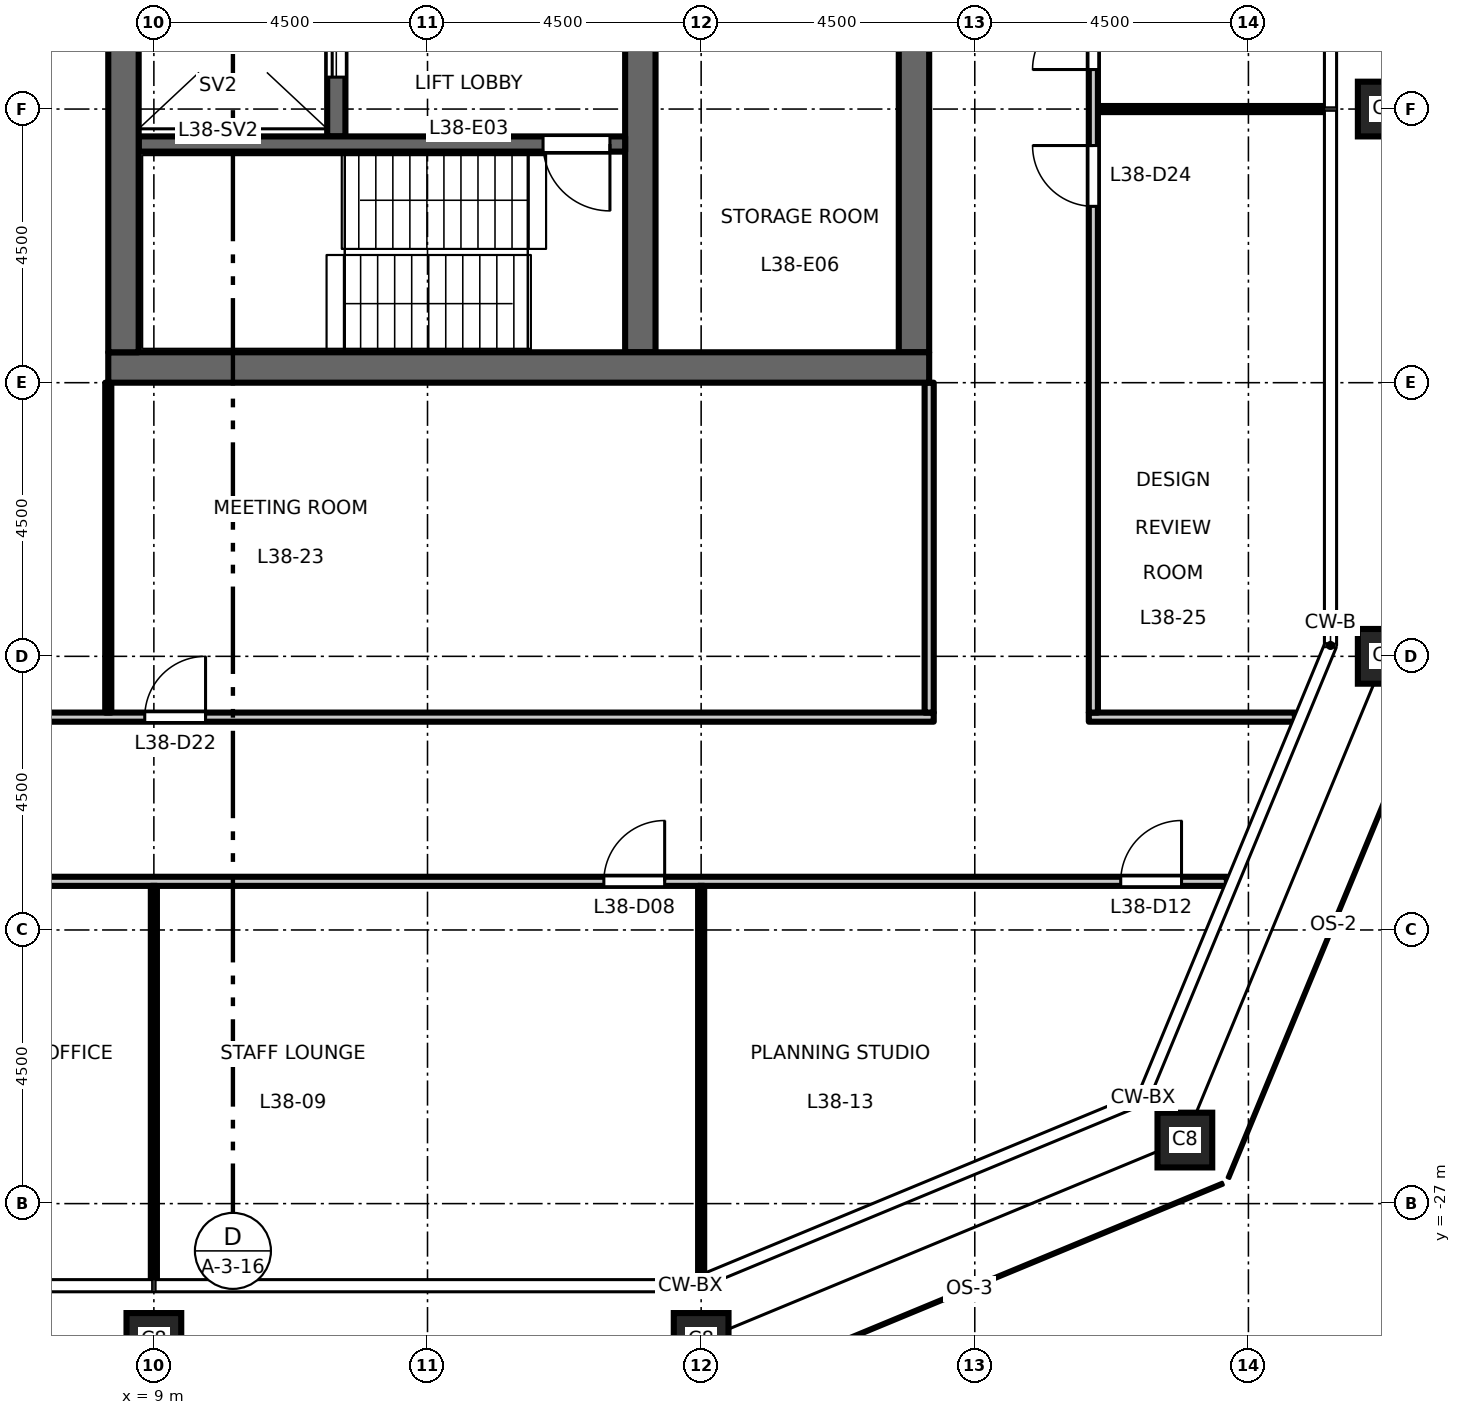
"""IFC4 building model, lengths in metres.
Left out: names, types, materials, properties, quantities, classifications, styles, units other than length and angle.
Written with IfcOpenShell. Run it as: python <this file> out.ifc"""

import sys

from ifc_helpers import new_model, si_unit, direction, frame, frame_2d, origin, origin_2d, place, context, subcontext, project, spatial, rectangle, hollow_rectangle, extrude, element, fill, save


model = new_model("IFC4")
c1 = context("Model", 3, precision=1e-05, world=origin(), true_north=direction((0.0, 1.0)))
c2 = subcontext(c1, "Body", "Model", "MODEL_VIEW")
j1 = project(units=[si_unit("LENGTHUNIT", "METRE"), si_unit("PLANEANGLEUNIT", "RADIAN")], contexts=[c1])
p1 = place(None, origin())
s1 = spatial("IfcSite", under=j1, at=p1, CompositionType="ELEMENT")
p2 = place(p1, origin())
s2 = spatial("IfcBuilding", under=s1, at=p2, CompositionType="ELEMENT")
p3 = place(p2, frame((0.0, 0.0, 176.7)))
s3 = spatial("IfcBuildingStorey", under=s2, at=p3, CompositionType="ELEMENT", Elevation=176.7)
for number, where, z_axis, x_axis in (
    (1, (9.0, -29.25, 0.0), (0.0, 0.0, 1.0), (1.0, 0.0, 0.0)),
    (2, (18.0, -29.25, 0.0), (0.0, 0.0, 1.0), (1.0, 0.0, 0.0)),
    (3, (25.955, -25.955, 0.0), (0.0, 0.0, 1.0), (1.0, 0.0, 0.0)),
    (4, (29.25, -18.0, 0.0), (0.0, 0.0, 1.0), (1.0, 0.0, 0.0)),
    (5, (29.25, -9.0, 0.0), (0.0, 0.0, 1.0), (1.0, 0.0, 0.0)),
):
    element("IfcColumn", number, at=place(p3, frame(where, z_axis=z_axis, x_axis=x_axis)), inside=s3, PredefinedType="COLUMN", context=c2, shape_type="SweptSolid", body=[
        extrude(hollow_rectangle(XDim=0.9, YDim=0.9, WallThickness=0.05, at=origin_2d()), origin(), (0.0, 0.0, 1.0), 4.5),
    ])
p4 = place(p3, frame((12.0, -9.45, 0.0), z_axis=(0.0, 0.0, 1.0), x_axis=(0.0, 1.0, 0.0)))
e6 = element("IfcWall", 6, at=p4, inside=s3, PredefinedType="SHEAR", context=c2, shape_type="SweptSolid", body=[
    extrude(rectangle(XDim=18.9, YDim=0.3, at=frame_2d((9.45, 0.0))), origin(), (0.0, 0.0, 1.0), 4.3),
])
p5 = place(p4, frame((3.625, 0.0, 0.0)))
e7 = element("IfcOpeningElement", 7, at=p5, cuts=e6, PredefinedType="OPENING", context=c2, shape_type="SweptSolid", body=[
    extrude(rectangle(XDim=1.1, YDim=2.1, at=frame_2d((0.55, 1.05))), frame((0.0, 0.16, 0.0), z_axis=(0.0, -1.0, 0.0), x_axis=(1.0, 0.0, 0.0)), (0.0, 0.0, 1.0), 0.32),
])
p6 = place(p4, frame((6.775, 0.0, 0.0)))
e8 = element("IfcOpeningElement", 8, at=p6, cuts=e6, PredefinedType="OPENING", context=c2, shape_type="SweptSolid", body=[
    extrude(rectangle(XDim=1.1, YDim=2.1, at=frame_2d((0.55, 1.05))), frame((0.0, 0.16, 0.0), z_axis=(0.0, -1.0, 0.0), x_axis=(1.0, 0.0, 0.0)), (0.0, 0.0, 1.0), 0.32),
])
p7 = place(p4, frame((9.925, 0.0, 0.0)))
e9 = element("IfcOpeningElement", 9, at=p7, cuts=e6, PredefinedType="OPENING", context=c2, shape_type="SweptSolid", body=[
    extrude(rectangle(XDim=1.1, YDim=2.1, at=frame_2d((0.55, 1.05))), frame((0.0, 0.16, 0.0), z_axis=(0.0, -1.0, 0.0), x_axis=(1.0, 0.0, 0.0)), (0.0, 0.0, 1.0), 0.32),
])
p8 = place(p4, frame((13.075, 0.0, 0.0)))
e10 = element("IfcOpeningElement", 10, at=p8, cuts=e6, PredefinedType="OPENING", context=c2, shape_type="SweptSolid", body=[
    extrude(rectangle(XDim=1.1, YDim=2.1, at=frame_2d((0.55, 1.05))), frame((0.0, 0.16, 0.0), z_axis=(0.0, -1.0, 0.0), x_axis=(1.0, 0.0, 0.0)), (0.0, 0.0, 1.0), 0.32),
])
p9 = place(p4, frame((16.725, 0.0, 0.0)))
e11 = element("IfcOpeningElement", 11, at=p9, cuts=e6, PredefinedType="OPENING", context=c2, shape_type="SweptSolid", body=[
    extrude(rectangle(XDim=1.2, YDim=2.1, at=frame_2d((0.6, 1.05))), frame((0.0, 0.16, 0.0), z_axis=(0.0, -1.0, 0.0), x_axis=(1.0, 0.0, 0.0)), (0.0, 0.0, 1.0), 0.32),
])
p10 = place(p4, frame((0.975, 0.0, 0.0)))
e12 = element("IfcOpeningElement", 12, at=p10, cuts=e6, PredefinedType="OPENING", context=c2, shape_type="SweptSolid", body=[
    extrude(rectangle(XDim=1.2, YDim=2.1, at=frame_2d((0.6, 1.05))), frame((0.0, 0.16, 0.0), z_axis=(0.0, -1.0, 0.0), x_axis=(1.0, 0.0, 0.0)), (0.0, 0.0, 1.0), 0.32),
])
p11 = place(p3, frame((21.5, -13.0, 0.0), z_axis=(0.0, 0.0, 1.0), x_axis=(0.0, 1.0, 0.0)))
e13 = element("IfcWall", 13, at=p11, inside=s3, PredefinedType="SHEAR", context=c2, shape_type="SweptSolid", body=[
    extrude(rectangle(XDim=26.0, YDim=0.5, at=frame_2d((13.0, 0.0))), origin(), (0.0, 0.0, 1.0), 4.3),
])
p12 = place(p11, frame((16.825, 0.0, 0.0)))
e14 = element("IfcOpeningElement", 14, at=p12, cuts=e13, PredefinedType="OPENING", context=c2, shape_type="SweptSolid", body=[
    extrude(rectangle(XDim=1.8, YDim=2.1, at=frame_2d((0.9, 1.05))), frame((0.0, 0.26, 0.0), z_axis=(0.0, -1.0, 0.0), x_axis=(1.0, 0.0, 0.0)), (0.0, 0.0, 1.0), 0.52),
])
p13 = place(p11, frame((7.375, 0.0, 0.0)))
e15 = element("IfcOpeningElement", 15, at=p13, cuts=e13, PredefinedType="OPENING", context=c2, shape_type="SweptSolid", body=[
    extrude(rectangle(XDim=1.8, YDim=2.1, at=frame_2d((0.9, 1.05))), frame((0.0, 0.26, 0.0), z_axis=(0.0, -1.0, 0.0), x_axis=(1.0, 0.0, 0.0)), (0.0, 0.0, 1.0), 0.52),
])
p14 = place(p3, frame((17.0, -13.0, 0.0), z_axis=(0.0, 0.0, 1.0), x_axis=(0.0, 1.0, 0.0)))
e16 = element("IfcWall", 16, at=p14, inside=s3, PredefinedType="SHEAR", context=c2, shape_type="SweptSolid", body=[
    extrude(rectangle(XDim=6.575, YDim=0.5, at=frame_2d((3.288, 0.0))), origin(), (0.0, 0.0, 1.0), 4.3),
])
p15 = place(p3, frame((8.75, -9.575, 0.0), z_axis=(0.0, 0.0, 1.0), x_axis=(1.0, 0.0, 0.0)))
e17 = element("IfcWall", 17, at=p15, inside=s3, PredefinedType="SHEAR", context=c2, shape_type="SweptSolid", body=[
    extrude(rectangle(XDim=8.0, YDim=0.25, at=frame_2d((4.0, 0.0))), origin(), (0.0, 0.0, 1.0), 4.3),
])
p16 = place(p15, frame((6.65, 0.0, 0.0)))
e18 = element("IfcOpeningElement", 18, at=p16, cuts=e17, PredefinedType="OPENING", context=c2, shape_type="SweptSolid", body=[
    extrude(rectangle(XDim=1.1, YDim=2.1, at=frame_2d((0.55, 1.05))), frame((0.0, 0.135, 0.0), z_axis=(0.0, -1.0, 0.0), x_axis=(1.0, 0.0, 0.0)), (0.0, 0.0, 1.0), 0.27),
])
p17 = place(p3, frame((8.25, -13.25, 0.0), z_axis=(0.0, 0.0, 1.0), x_axis=(1.0, 0.0, 0.0)))
e19 = element("IfcWall", 19, at=p17, inside=s3, PredefinedType="SHEAR", context=c2, shape_type="SweptSolid", body=[
    extrude(rectangle(XDim=13.5, YDim=0.5, at=frame_2d((6.75, 0.0))), origin(), (0.0, 0.0, 1.0), 4.3),
])
p18 = place(p3, frame((8.5, -13.0, 0.0), z_axis=(0.0, 0.0, 1.0), x_axis=(0.0, 1.0, 0.0)))
e20 = element("IfcWall", 20, at=p18, inside=s3, PredefinedType="SHEAR", context=c2, shape_type="SweptSolid", body=[
    extrude(rectangle(XDim=26.0, YDim=0.5, at=frame_2d((13.0, 0.0))), origin(), (0.0, 0.0, 1.0), 4.3),
])
p19 = place(p3, frame((-26.646, -21.7, 0.0), z_axis=(0.0, 0.0, 1.0), x_axis=(1.0, 0.0, 0.0)))
e21 = element("IfcWall", 21, at=p19, inside=s3, PredefinedType="PARTITIONING", context=c2, shape_type="SweptSolid", body=[
    extrude(rectangle(XDim=53.292, YDim=0.15, at=frame_2d((26.646, 0.0))), origin(), (0.0, 0.0, 1.0), 4.3),
])
p20 = place(p19, frame((9.296, 0.0, 0.0)))
e22 = element("IfcOpeningElement", 22, at=p20, cuts=e21, PredefinedType="OPENING", context=c2, shape_type="SweptSolid", body=[
    extrude(rectangle(XDim=1.0, YDim=2.1, at=frame_2d((0.5, 1.05))), frame((0.0, 0.085, 0.0), z_axis=(0.0, -1.0, 0.0), x_axis=(1.0, 0.0, 0.0)), (0.0, 0.0, 1.0), 0.17),
])
p21 = place(p19, frame((25.046, 0.0, 0.0)))
e23 = element("IfcOpeningElement", 23, at=p21, cuts=e21, PredefinedType="OPENING", context=c2, shape_type="SweptSolid", body=[
    extrude(rectangle(XDim=1.0, YDim=2.1, at=frame_2d((0.5, 1.05))), frame((0.0, 0.085, 0.0), z_axis=(0.0, -1.0, 0.0), x_axis=(1.0, 0.0, 0.0)), (0.0, 0.0, 1.0), 0.17),
])
p22 = place(p19, frame((27.296, 0.0, 0.0)))
e24 = element("IfcOpeningElement", 24, at=p22, cuts=e21, PredefinedType="OPENING", context=c2, shape_type="SweptSolid", body=[
    extrude(rectangle(XDim=1.0, YDim=2.1, at=frame_2d((0.5, 1.05))), frame((0.0, 0.085, 0.0), z_axis=(0.0, -1.0, 0.0), x_axis=(1.0, 0.0, 0.0)), (0.0, 0.0, 1.0), 0.17),
])
p23 = place(p19, frame((43.046, 0.0, 0.0)))
e25 = element("IfcOpeningElement", 25, at=p23, cuts=e21, PredefinedType="OPENING", context=c2, shape_type="SweptSolid", body=[
    extrude(rectangle(XDim=1.0, YDim=2.1, at=frame_2d((0.5, 1.05))), frame((0.0, 0.085, 0.0), z_axis=(0.0, -1.0, 0.0), x_axis=(1.0, 0.0, 0.0)), (0.0, 0.0, 1.0), 0.17),
])
p24 = place(p19, frame((0.65, 0.0, 0.0)))
e26 = element("IfcOpeningElement", 26, at=p24, cuts=e21, PredefinedType="OPENING", context=c2, shape_type="SweptSolid", body=[
    extrude(rectangle(XDim=1.0, YDim=2.1, at=frame_2d((0.5, 1.05))), frame((0.0, 0.085, 0.0), z_axis=(0.0, -1.0, 0.0), x_axis=(1.0, 0.0, 0.0)), (0.0, 0.0, 1.0), 0.17),
])
p25 = place(p19, frame((51.546, 0.0, 0.0)))
e27 = element("IfcOpeningElement", 27, at=p25, cuts=e21, PredefinedType="OPENING", context=c2, shape_type="SweptSolid", body=[
    extrude(rectangle(XDim=1.0, YDim=2.1, at=frame_2d((0.5, 1.05))), frame((0.0, 0.085, 0.0), z_axis=(0.0, -1.0, 0.0), x_axis=(1.0, 0.0, 0.0)), (0.0, 0.0, 1.0), 0.17),
])
p26 = place(p3, frame((-21.825, -19.0, 0.0), z_axis=(0.0, 0.0, 1.0), x_axis=(1.0, 0.0, 0.0)))
e28 = element("IfcWall", 28, at=p26, inside=s3, PredefinedType="PARTITIONING", context=c2, shape_type="SweptSolid", body=[
    extrude(rectangle(XDim=43.65, YDim=0.15, at=frame_2d((21.825, 0.0))), origin(), (0.0, 0.0, 1.0), 4.3),
])
p27 = place(p26, frame((14.175, 0.0, 0.0)))
e29 = element("IfcOpeningElement", 29, at=p27, cuts=e28, PredefinedType="OPENING", context=c2, shape_type="SweptSolid", body=[
    extrude(rectangle(XDim=1.0, YDim=2.1, at=frame_2d((0.5, 1.05))), frame((0.0, 0.085, 0.0), z_axis=(0.0, -1.0, 0.0), x_axis=(1.0, 0.0, 0.0)), (0.0, 0.0, 1.0), 0.17),
])
p28 = place(p26, frame((11.925, 0.0, 0.0)))
e30 = element("IfcOpeningElement", 30, at=p28, cuts=e28, PredefinedType="OPENING", context=c2, shape_type="SweptSolid", body=[
    extrude(rectangle(XDim=1.0, YDim=2.1, at=frame_2d((0.5, 1.05))), frame((0.0, 0.085, 0.0), z_axis=(0.0, -1.0, 0.0), x_axis=(1.0, 0.0, 0.0)), (0.0, 0.0, 1.0), 0.17),
])
p29 = place(p26, frame((30.675, 0.0, 0.0)))
e31 = element("IfcOpeningElement", 31, at=p29, cuts=e28, PredefinedType="OPENING", context=c2, shape_type="SweptSolid", body=[
    extrude(rectangle(XDim=1.0, YDim=2.1, at=frame_2d((0.5, 1.05))), frame((0.0, 0.085, 0.0), z_axis=(0.0, -1.0, 0.0), x_axis=(1.0, 0.0, 0.0)), (0.0, 0.0, 1.0), 0.17),
])
p30 = place(p3, frame((24.375, -19.0, 0.0), z_axis=(0.0, 0.0, 1.0), x_axis=(1.0, 0.0, 0.0)))
e32 = element("IfcWall", 32, at=p30, inside=s3, PredefinedType="PARTITIONING", context=c2, shape_type="SweptSolid", body=[
    extrude(rectangle(XDim=3.389, YDim=0.15, at=frame_2d((1.694, 0.0))), origin(), (0.0, 0.0, 1.0), 4.3),
])
p31 = place(p3, frame((24.525, -9.0, 0.0), z_axis=(0.0, 0.0, 1.0), x_axis=(1.0, 0.0, 0.0)))
e33 = element("IfcWall", 33, at=p31, inside=s3, PredefinedType="PARTITIONING", context=c2, shape_type="SweptSolid", body=[
    extrude(rectangle(XDim=3.735, YDim=0.1, at=frame_2d((1.868, 0.0))), origin(), (0.0, 0.0, 1.0), 4.3),
])
p32 = place(p3, frame((8.25, -18.925, 0.0), z_axis=(0.0, 0.0, 1.0), x_axis=(0.0, 1.0, 0.0)))
e34 = element("IfcWall", 34, at=p32, inside=s3, PredefinedType="PARTITIONING", context=c2, shape_type="SweptSolid", body=[
    extrude(rectangle(XDim=5.425, YDim=0.1, at=frame_2d((2.712, 0.0))), origin(), (0.0, 0.0, 1.0), 4.3),
])
p33 = place(p3, frame((9.0, -28.26, 0.0), z_axis=(0.0, 0.0, 1.0), x_axis=(0.0, 1.0, 0.0)))
e35 = element("IfcWall", 35, at=p33, inside=s3, PredefinedType="PARTITIONING", context=c2, shape_type="SweptSolid", body=[
    extrude(rectangle(XDim=6.485, YDim=0.1, at=frame_2d((3.243, 0.0))), origin(), (0.0, 0.0, 1.0), 3.4),
])
p34 = place(p3, frame((18.0, -28.178, 0.0), z_axis=(0.0, 0.0, 1.0), x_axis=(0.0, 1.0, 0.0)))
e36 = element("IfcWall", 36, at=p34, inside=s3, PredefinedType="PARTITIONING", context=c2, shape_type="SweptSolid", body=[
    extrude(rectangle(XDim=6.403, YDim=0.1, at=frame_2d((3.202, 0.0))), origin(), (0.0, 0.0, 1.0), 3.4),
])
p35 = place(p3, frame((21.75, -18.925, 0.0), z_axis=(0.0, 0.0, 1.0), x_axis=(0.0, 1.0, 0.0)))
e37 = element("IfcWall", 37, at=p35, inside=s3, PredefinedType="PARTITIONING", context=c2, shape_type="SweptSolid", body=[
    extrude(rectangle(XDim=5.425, YDim=0.15, at=frame_2d((2.712, 0.0))), origin(), (0.0, 0.0, 1.0), 4.3),
])
p36 = place(p3, frame((24.45, -18.925, 0.0), z_axis=(0.0, 0.0, 1.0), x_axis=(0.0, 1.0, 0.0)))
e38 = element("IfcWall", 38, at=p36, inside=s3, PredefinedType="PARTITIONING", context=c2, shape_type="SweptSolid", body=[
    extrude(rectangle(XDim=37.85, YDim=0.15, at=frame_2d((18.925, 0.0))), origin(), (0.0, 0.0, 1.0), 4.3),
])
p37 = place(p36, frame((8.325, 0.0, 0.0)))
e39 = element("IfcOpeningElement", 39, at=p37, cuts=e38, PredefinedType="OPENING", context=c2, shape_type="SweptSolid", body=[
    extrude(rectangle(XDim=1.0, YDim=2.1, at=frame_2d((0.5, 1.05))), frame((0.0, 0.085, 0.0), z_axis=(0.0, -1.0, 0.0), x_axis=(1.0, 0.0, 0.0)), (0.0, 0.0, 1.0), 0.17),
])
p38 = place(p36, frame((10.575, 0.0, 0.0)))
e40 = element("IfcOpeningElement", 40, at=p38, cuts=e38, PredefinedType="OPENING", context=c2, shape_type="SweptSolid", body=[
    extrude(rectangle(XDim=1.0, YDim=2.1, at=frame_2d((0.5, 1.05))), frame((0.0, 0.085, 0.0), z_axis=(0.0, -1.0, 0.0), x_axis=(1.0, 0.0, 0.0)), (0.0, 0.0, 1.0), 0.17),
])
p39 = place(p36, frame((26.325, 0.0, 0.0)))
e41 = element("IfcOpeningElement", 41, at=p39, cuts=e38, PredefinedType="OPENING", context=c2, shape_type="SweptSolid", body=[
    extrude(rectangle(XDim=1.0, YDim=2.1, at=frame_2d((0.5, 1.05))), frame((0.0, 0.085, 0.0), z_axis=(0.0, -1.0, 0.0), x_axis=(1.0, 0.0, 0.0)), (0.0, 0.0, 1.0), 0.17),
])
p40 = place(p36, frame((28.575, 0.0, 0.0)))
e42 = element("IfcOpeningElement", 42, at=p40, cuts=e38, PredefinedType="OPENING", context=c2, shape_type="SweptSolid", body=[
    extrude(rectangle(XDim=1.0, YDim=2.1, at=frame_2d((0.5, 1.05))), frame((0.0, 0.085, 0.0), z_axis=(0.0, -1.0, 0.0), x_axis=(1.0, 0.0, 0.0)), (0.0, 0.0, 1.0), 0.17),
])
p41 = place(p16, origin())
e43 = element("IfcDoor", 43, at=p41, inside=s3, OperationType="SINGLE_SWING_RIGHT", PredefinedType="DOOR", context=c2, shape_type="SweptSolid", body=[
    extrude(rectangle(XDim=1.1, YDim=2.1, at=frame_2d((0.55, 1.05))), frame((0.0, 0.025, 0.0), z_axis=(0.0, -1.0, 0.0), x_axis=(1.0, 0.0, 0.0)), (0.0, 0.0, 1.0), 0.05),
])
fill(e18, e43)
p42 = place(p10, origin())
e44 = element("IfcDoor", 44, at=p42, inside=s3, OperationType="DOUBLE_DOOR_SLIDING", PredefinedType="DOOR", context=c2, shape_type="SweptSolid", body=[
    extrude(rectangle(XDim=1.2, YDim=2.1, at=frame_2d((0.6, 1.05))), frame((0.0, 0.025, 0.0), z_axis=(0.0, -1.0, 0.0), x_axis=(1.0, 0.0, 0.0)), (0.0, 0.0, 1.0), 0.05),
])
fill(e12, e44)
p43 = place(p23, origin())
e45 = element("IfcDoor", 45, at=p43, inside=s3, OperationType="SINGLE_SWING_RIGHT", PredefinedType="DOOR", context=c2, shape_type="SweptSolid", body=[
    extrude(rectangle(XDim=1.0, YDim=2.1, at=frame_2d((0.5, 1.05))), frame((0.0, 0.025, 0.0), z_axis=(0.0, -1.0, 0.0), x_axis=(1.0, 0.0, 0.0)), (0.0, 0.0, 1.0), 0.05),
])
fill(e25, e45)
p44 = place(p25, origin())
e46 = element("IfcDoor", 46, at=p44, inside=s3, OperationType="SINGLE_SWING_RIGHT", PredefinedType="DOOR", context=c2, shape_type="SweptSolid", body=[
    extrude(rectangle(XDim=1.0, YDim=2.1, at=frame_2d((0.5, 1.05))), frame((0.0, 0.025, 0.0), z_axis=(0.0, -1.0, 0.0), x_axis=(1.0, 0.0, 0.0)), (0.0, 0.0, 1.0), 0.05),
])
fill(e27, e46)
p45 = place(p29, origin())
e47 = element("IfcDoor", 47, at=p45, inside=s3, OperationType="SINGLE_SWING_RIGHT", PredefinedType="DOOR", context=c2, shape_type="SweptSolid", body=[
    extrude(rectangle(XDim=1.0, YDim=2.1, at=frame_2d((0.5, 1.05))), frame((0.0, 0.025, 0.0), z_axis=(0.0, -1.0, 0.0), x_axis=(1.0, 0.0, 0.0)), (0.0, 0.0, 1.0), 0.05),
])
fill(e31, e47)
p46 = place(p37, origin())
e48 = element("IfcDoor", 48, at=p46, inside=s3, OperationType="SINGLE_SWING_RIGHT", PredefinedType="DOOR", context=c2, shape_type="SweptSolid", body=[
    extrude(rectangle(XDim=1.0, YDim=2.1, at=frame_2d((0.5, 1.05))), frame((0.0, 0.025, 0.0), z_axis=(0.0, -1.0, 0.0), x_axis=(1.0, 0.0, 0.0)), (0.0, 0.0, 1.0), 0.05),
])
fill(e39, e48)
p47 = place(p38, origin())
e49 = element("IfcDoor", 49, at=p47, inside=s3, OperationType="SINGLE_SWING_LEFT", PredefinedType="DOOR", context=c2, shape_type="SweptSolid", body=[
    extrude(rectangle(XDim=1.0, YDim=2.1, at=frame_2d((0.5, 1.05))), frame((0.0, 0.025, 0.0), z_axis=(0.0, -1.0, 0.0), x_axis=(1.0, 0.0, 0.0)), (0.0, 0.0, 1.0), 0.05),
])
fill(e40, e49)
save(model, sys.argv[1])
